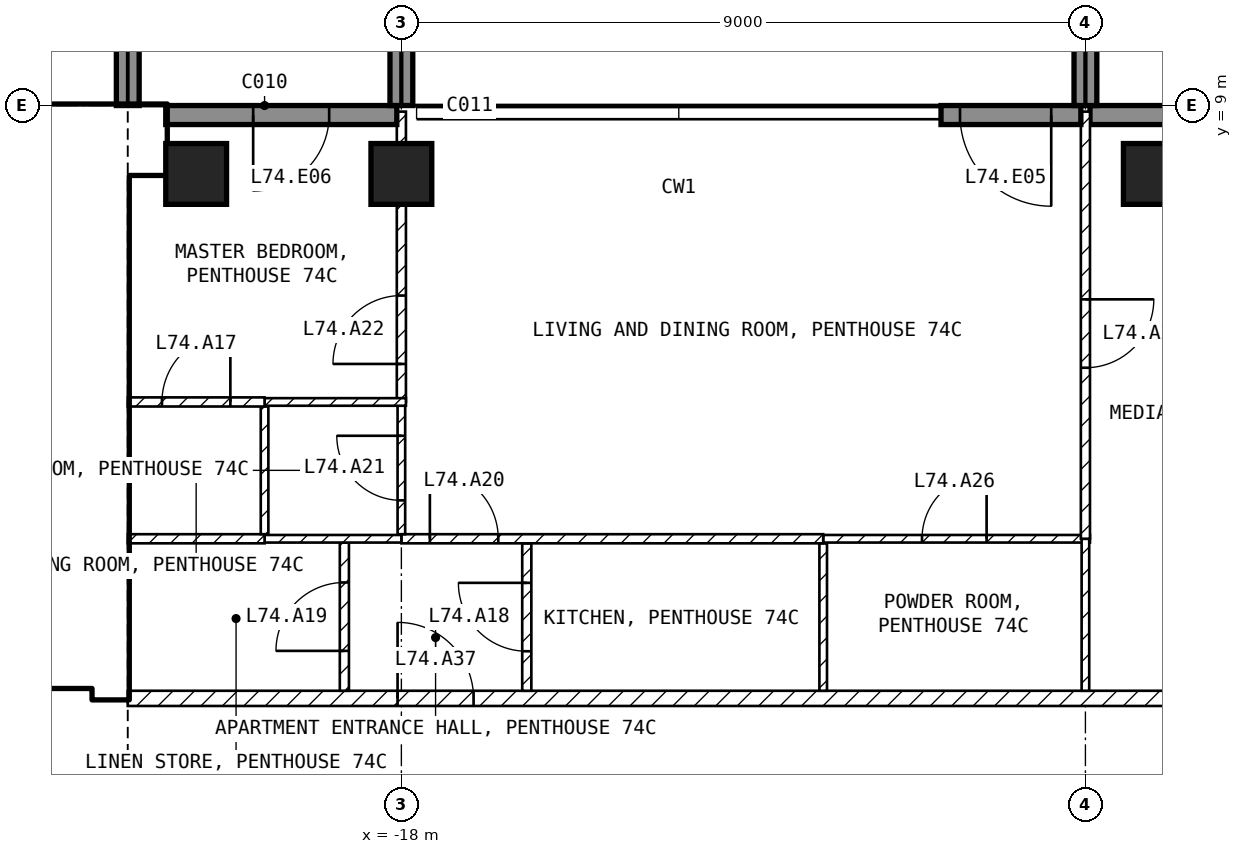
"""IFC4 building model, lengths in metres.
Left out: names, types, materials, properties, quantities, classifications, styles, units other than length and angle.
Written with IfcOpenShell. Run it as: python <this file> out.ifc"""

import sys

from ifc_helpers import new_model, si_unit, direction, frame, frame_2d, origin, origin_2d, place, context, subcontext, project, spatial, rectangle, extrude, element, fill, save


model = new_model("IFC4")
c1 = context("Model", 3, precision=1e-05, world=origin(), true_north=direction((0.0, 1.0)))
c2 = subcontext(c1, "Body", "Model", "MODEL_VIEW")
j1 = project(units=[si_unit("LENGTHUNIT", "METRE"), si_unit("PLANEANGLEUNIT", "RADIAN")], contexts=[c1])
p1 = place(None, origin())
s1 = spatial("IfcSite", under=j1, at=p1, CompositionType="ELEMENT")
p2 = place(p1, origin())
s2 = spatial("IfcBuilding", under=s1, at=p2, CompositionType="ELEMENT")
p3 = place(p2, frame((0.0, 0.0, 290.4)))
s3 = spatial("IfcBuildingStorey", under=s2, at=p3, CompositionType="ELEMENT", Elevation=290.4)
for number, where, z_axis, x_axis in (
    (1, (-20.7, 8.1, -0.25), (0.0, 0.0, 1.0), (1.0, 0.0, 0.0)),
    (2, (-18.0, 8.1, -0.25), (0.0, 0.0, 1.0), (1.0, 0.0, 0.0)),
    (3, (-8.1, 8.1, -0.25), (0.0, 0.0, 1.0), (1.0, 0.0, 0.0)),
):
    element("IfcColumn", number, at=place(p3, frame(where, z_axis=z_axis, x_axis=x_axis)), inside=s3, PredefinedType="COLUMN", context=c2, shape_type="SweptSolid", body=[
        extrude(rectangle(XDim=0.8, YDim=0.8, at=origin_2d()), origin(), (0.0, 0.0, 1.0), 4.2),
    ])
p4 = place(p3, frame((-5.9, 8.875, 0.0), z_axis=(0.0, 0.0, 1.0), x_axis=(-1.0, 0.0, 0.0)))
e4 = element("IfcWall", 4, at=p4, inside=s3, PredefinedType="SOLIDWALL", context=c2, shape_type="SweptSolid", body=[
    extrude(rectangle(XDim=3.04, YDim=0.25, at=frame_2d((1.52, 0.0))), origin(), (0.0, 0.0, 1.0), 3.95),
])
p5 = place(p4, frame((0.25, 0.0, 0.0)))
e5 = element("IfcOpeningElement", 5, at=p5, cuts=e4, PredefinedType="OPENING", context=c2, shape_type="SweptSolid", body=[
    extrude(rectangle(XDim=1.2, YDim=2.4, at=frame_2d((0.6, 1.2))), frame((0.0, 0.135, 0.0), z_axis=(0.0, -1.0, 0.0), x_axis=(1.0, 0.0, 0.0)), (0.0, 0.0, 1.0), 0.27),
])
p6 = place(p3, frame((-9.06, 8.875, 0.0), z_axis=(0.0, 0.0, 1.0), x_axis=(-1.0, 0.0, 0.0)))
e6 = element("IfcWall", 6, at=p6, inside=s3, PredefinedType="SOLIDWALL", context=c2, shape_type="SweptSolid", body=[
    extrude(rectangle(XDim=1.84, YDim=0.25, at=frame_2d((0.92, 0.0))), origin(), (0.0, 0.0, 1.0), 3.95),
])
p7 = place(p6, frame((0.39, 0.0, 0.0)))
e7 = element("IfcOpeningElement", 7, at=p7, cuts=e6, PredefinedType="OPENING", context=c2, shape_type="SweptSolid", body=[
    extrude(rectangle(XDim=1.2, YDim=2.4, at=frame_2d((0.6, 1.2))), frame((0.0, 0.135, 0.0), z_axis=(0.0, -1.0, 0.0), x_axis=(1.0, 0.0, 0.0)), (0.0, 0.0, 1.0), 0.27),
])
p8 = place(p3, frame((-18.06, 8.875, 0.0), z_axis=(0.0, 0.0, 1.0), x_axis=(-1.0, 0.0, 0.0)))
e8 = element("IfcWall", 8, at=p8, inside=s3, PredefinedType="SOLIDWALL", context=c2, shape_type="SweptSolid", body=[
    extrude(rectangle(XDim=3.04, YDim=0.25, at=frame_2d((1.52, 0.0))), origin(), (0.0, 0.0, 1.0), 3.95),
])
p9 = place(p8, frame((0.89, 0.0, 0.0)))
e9 = element("IfcOpeningElement", 9, at=p9, cuts=e8, PredefinedType="OPENING", context=c2, shape_type="SweptSolid", body=[
    extrude(rectangle(XDim=1.0, YDim=2.4, at=frame_2d((0.5, 1.2))), frame((0.0, 0.135, 0.0), z_axis=(0.0, -1.0, 0.0), x_axis=(1.0, 0.0, 0.0)), (0.0, 0.0, 1.0), 0.27),
])
for number, where, z_axis, x_axis in (
    (10, (-21.6, 9.0, 0.0), (0.0, 0.0, 1.0), (0.0, 1.0, 0.0)),
    (11, (-18.0, 9.0, 0.0), (0.0, 0.0, 1.0), (0.0, 1.0, 0.0)),
    (12, (-9.0, 9.0, 0.0), (0.0, 0.0, 1.0), (0.0, 1.0, 0.0)),
):
    element("IfcWall", number, at=place(p3, frame(where, z_axis=z_axis, x_axis=x_axis)), inside=s3, PredefinedType="SOLIDWALL", context=c2, shape_type="SweptSolid", body=[
        extrude(rectangle(XDim=2.7, YDim=0.3, at=frame_2d((1.35, 0.0))), origin(), (0.0, 0.0, 1.0), 3.95),
    ])
p10 = place(p3, frame((-29.75, 8.55, 0.0), z_axis=(0.0, 0.0, 1.0), x_axis=(1.0, 0.0, 0.0)))
e13 = element("IfcWall", 13, at=p10, inside=s3, PredefinedType="SHEAR", context=c2, shape_type="SweptSolid", body=[
    extrude(rectangle(XDim=8.65, YDim=0.9, at=frame_2d((4.325, 0.0))), origin(), (0.0, 0.0, 1.0), 3.95),
])
p11 = place(p3, frame((-21.825, 1.2, 0.0), z_axis=(0.0, 0.0, 1.0), x_axis=(0.0, 1.0, 0.0)))
e14 = element("IfcWall", 14, at=p11, inside=s3, PredefinedType="SHEAR", context=c2, shape_type="SweptSolid", body=[
    extrude(rectangle(XDim=6.9, YDim=0.45, at=frame_2d((3.45, 0.0))), origin(), (0.0, 0.0, 1.0), 3.95),
])
p12 = place(p3, frame((-33.35, 1.45, 0.0), z_axis=(0.0, 0.0, 1.0), x_axis=(1.0, 0.0, 0.0)))
e15 = element("IfcWall", 15, at=p12, inside=s3, PredefinedType="SOLIDWALL", context=c2, shape_type="SweptSolid", body=[
    extrude(rectangle(XDim=11.3, YDim=0.2, at=frame_2d((5.65, 0.0))), origin(), (0.0, 0.0, 1.0), 3.95),
])
p13 = place(p12, frame((9.55, 0.0, 0.0)))
e16 = element("IfcOpeningElement", 16, at=p13, cuts=e15, PredefinedType="OPENING", context=c2, shape_type="SweptSolid", body=[
    extrude(rectangle(XDim=1.0, YDim=2.1, at=frame_2d((0.5, 1.05))), frame((0.0, 0.11, 0.0), z_axis=(0.0, -1.0, 0.0), x_axis=(1.0, 0.0, 0.0)), (0.0, 0.0, 1.0), 0.22),
])
p14 = place(p12, frame((7.05, 0.0, 0.0)))
e17 = element("IfcOpeningElement", 17, at=p14, cuts=e15, PredefinedType="OPENING", context=c2, shape_type="SweptSolid", body=[
    extrude(rectangle(XDim=1.0, YDim=2.1, at=frame_2d((0.5, 1.05))), frame((0.0, 0.11, 0.0), z_axis=(0.0, -1.0, 0.0), x_axis=(1.0, 0.0, 0.0)), (0.0, 0.0, 1.0), 0.22),
])
p15 = place(p12, frame((1.175, 0.0, 0.0)))
e18 = element("IfcOpeningElement", 18, at=p15, cuts=e15, PredefinedType="OPENING", context=c2, shape_type="SweptSolid", body=[
    extrude(rectangle(XDim=0.9, YDim=2.1, at=frame_2d((0.45, 1.05))), frame((0.0, 0.11, 0.0), z_axis=(0.0, -1.0, 0.0), x_axis=(1.0, 0.0, 0.0)), (0.0, 0.0, 1.0), 0.22),
])
p16 = place(p3, frame((-28.35, 5.15, 0.0), z_axis=(0.0, 0.0, 1.0), x_axis=(1.0, 0.0, 0.0)))
e19 = element("IfcWall", 19, at=p16, inside=s3, PredefinedType="SOLIDWALL", context=c2, shape_type="SweptSolid", body=[
    extrude(rectangle(XDim=6.3, YDim=0.2, at=frame_2d((3.15, 0.0))), origin(), (0.0, 0.0, 1.0), 3.95),
])
p17 = place(p16, frame((5.1, 0.0, 0.0)))
e20 = element("IfcOpeningElement", 20, at=p17, cuts=e19, PredefinedType="OPENING", context=c2, shape_type="SweptSolid", body=[
    extrude(rectangle(XDim=1.0, YDim=2.1, at=frame_2d((0.5, 1.05))), frame((0.0, 0.11, 0.0), z_axis=(0.0, -1.0, 0.0), x_axis=(1.0, 0.0, 0.0)), (0.0, 0.0, 1.0), 0.22),
])
p18 = place(p3, frame((-21.6, 1.2, 0.0), z_axis=(0.0, 0.0, 1.0), x_axis=(1.0, 0.0, 0.0)))
e21 = element("IfcWall", 21, at=p18, inside=s3, PredefinedType="PARTITIONING", context=c2, shape_type="SweptSolid", body=[
    extrude(rectangle(XDim=20.5, YDim=0.2, at=frame_2d((10.25, 0.0))), origin(), (0.0, 0.0, 1.0), 3.95),
])
p19 = place(p18, frame((3.55, 0.0, 0.0)))
e22 = element("IfcOpeningElement", 22, at=p19, cuts=e21, PredefinedType="OPENING", context=c2, shape_type="SweptSolid", body=[
    extrude(rectangle(XDim=1.0, YDim=2.1, at=frame_2d((0.5, 1.05))), frame((0.0, 0.11, 0.0), z_axis=(0.0, -1.0, 0.0), x_axis=(1.0, 0.0, 0.0)), (0.0, 0.0, 1.0), 0.22),
])
p20 = place(p3, frame((-12.45, 1.3, 0.0), z_axis=(0.0, 0.0, 1.0), x_axis=(0.0, 1.0, 0.0)))
e23 = element("IfcWall", 23, at=p20, inside=s3, PredefinedType="PARTITIONING", context=c2, shape_type="SweptSolid", body=[
    extrude(rectangle(XDim=1.94, YDim=0.1, at=frame_2d((0.97, 0.0))), origin(), (0.0, 0.0, 1.0), 3.95),
])
p21 = place(p3, frame((-12.45, 3.3, 0.0), z_axis=(0.0, 0.0, 1.0), x_axis=(1.0, 0.0, 0.0)))
e24 = element("IfcWall", 24, at=p21, inside=s3, PredefinedType="PARTITIONING", context=c2, shape_type="SweptSolid", body=[
    extrude(rectangle(XDim=3.51, YDim=0.1, at=frame_2d((1.755, 0.0))), origin(), (0.0, 0.0, 1.0), 3.95),
])
p22 = place(p21, frame((1.3, 0.0, 0.0)))
e25 = element("IfcOpeningElement", 25, at=p22, cuts=e24, PredefinedType="OPENING", context=c2, shape_type="SweptSolid", body=[
    extrude(rectangle(XDim=0.85, YDim=2.1, at=frame_2d((0.425, 1.05))), frame((0.0, 0.06, 0.0), z_axis=(0.0, -1.0, 0.0), x_axis=(1.0, 0.0, 0.0)), (0.0, 0.0, 1.0), 0.12),
])
p23 = place(p3, frame((-9.0, 3.3, 0.0), z_axis=(0.0, 0.0, 1.0), x_axis=(0.0, -1.0, 0.0)))
e26 = element("IfcWall", 26, at=p23, inside=s3, PredefinedType="PARTITIONING", context=c2, shape_type="SweptSolid", body=[
    extrude(rectangle(XDim=2.0, YDim=0.1, at=frame_2d((1.0, 0.0))), origin(), (0.0, 0.0, 1.0), 3.95),
])
p24 = place(p3, frame((-16.35, 1.3, 0.0), z_axis=(0.0, 0.0, 1.0), x_axis=(0.0, 1.0, 0.0)))
e27 = element("IfcWall", 27, at=p24, inside=s3, PredefinedType="PARTITIONING", context=c2, shape_type="SweptSolid", body=[
    extrude(rectangle(XDim=1.94, YDim=0.12, at=frame_2d((0.97, 0.0))), origin(), (0.0, 0.0, 1.0), 3.95),
])
p25 = place(p24, frame((0.52, 0.0, 0.0)))
e28 = element("IfcOpeningElement", 28, at=p25, cuts=e27, PredefinedType="OPENING", context=c2, shape_type="SweptSolid", body=[
    extrude(rectangle(XDim=0.9, YDim=2.1, at=frame_2d((0.45, 1.05))), frame((0.0, 0.07, 0.0), z_axis=(0.0, -1.0, 0.0), x_axis=(1.0, 0.0, 0.0)), (0.0, 0.0, 1.0), 0.14),
])
p26 = place(p3, frame((-18.0, 3.3, 0.0), z_axis=(0.0, 0.0, 1.0), x_axis=(1.0, 0.0, 0.0)))
e29 = element("IfcWall", 29, at=p26, inside=s3, PredefinedType="PARTITIONING", context=c2, shape_type="SweptSolid", body=[
    extrude(rectangle(XDim=5.55, YDim=0.12, at=frame_2d((2.775, 0.0))), origin(), (0.0, 0.0, 1.0), 3.95),
])
p27 = place(p26, frame((0.375, 0.0, 0.0)))
e30 = element("IfcOpeningElement", 30, at=p27, cuts=e29, PredefinedType="OPENING", context=c2, shape_type="SweptSolid", body=[
    extrude(rectangle(XDim=0.9, YDim=2.1, at=frame_2d((0.45, 1.05))), frame((0.0, 0.07, 0.0), z_axis=(0.0, -1.0, 0.0), x_axis=(1.0, 0.0, 0.0)), (0.0, 0.0, 1.0), 0.14),
])
p28 = place(p3, frame((-18.75, 1.3, 0.0), z_axis=(0.0, 0.0, 1.0), x_axis=(0.0, 1.0, 0.0)))
e31 = element("IfcWall", 31, at=p28, inside=s3, PredefinedType="PARTITIONING", context=c2, shape_type="SweptSolid", body=[
    extrude(rectangle(XDim=1.95, YDim=0.12, at=frame_2d((0.975, 0.0))), origin(), (0.0, 0.0, 1.0), 3.95),
])
p29 = place(p28, frame((0.525, 0.0, 0.0)))
e32 = element("IfcOpeningElement", 32, at=p29, cuts=e31, PredefinedType="OPENING", context=c2, shape_type="SweptSolid", body=[
    extrude(rectangle(XDim=0.9, YDim=2.1, at=frame_2d((0.45, 1.05))), frame((0.0, 0.07, 0.0), z_axis=(0.0, -1.0, 0.0), x_axis=(1.0, 0.0, 0.0)), (0.0, 0.0, 1.0), 0.14),
])
p30 = place(p3, frame((-19.8, 3.3, 0.0), z_axis=(0.0, 0.0, 1.0), x_axis=(1.0, 0.0, 0.0)))
e33 = element("IfcWall", 33, at=p30, inside=s3, PredefinedType="PARTITIONING", context=c2, shape_type="SweptSolid", body=[
    extrude(rectangle(XDim=1.8, YDim=0.1, at=frame_2d((0.9, 0.0))), origin(), (0.0, 0.0, 1.0), 3.95),
])
p31 = place(p3, frame((-21.6, 3.3, 0.0), z_axis=(0.0, 0.0, 1.0), x_axis=(1.0, 0.0, 0.0)))
e34 = element("IfcWall", 34, at=p31, inside=s3, PredefinedType="PARTITIONING", context=c2, shape_type="SweptSolid", body=[
    extrude(rectangle(XDim=1.8, YDim=0.12, at=frame_2d((0.9, 0.0))), origin(), (0.0, 0.0, 1.0), 3.95),
])
p32 = place(p3, frame((-18.0, 3.36, 0.0), z_axis=(0.0, 0.0, 1.0), x_axis=(0.0, 1.0, 0.0)))
e35 = element("IfcWall", 35, at=p32, inside=s3, PredefinedType="PARTITIONING", context=c2, shape_type="SweptSolid", body=[
    extrude(rectangle(XDim=1.74, YDim=0.1, at=frame_2d((0.87, 0.0))), origin(), (0.0, 0.0, 1.0), 3.196),
])
p33 = place(p32, frame((0.445, 0.0, 0.0)))
e36 = element("IfcOpeningElement", 36, at=p33, cuts=e35, PredefinedType="OPENING", context=c2, shape_type="SweptSolid", body=[
    extrude(rectangle(XDim=0.85, YDim=2.1, at=frame_2d((0.425, 1.05))), frame((0.0, 0.06, 0.0), z_axis=(0.0, -1.0, 0.0), x_axis=(1.0, 0.0, 0.0)), (0.0, 0.0, 1.0), 0.12),
])
p34 = place(p3, frame((-18.0, 5.1, 0.0), z_axis=(0.0, 0.0, 1.0), x_axis=(0.0, 1.0, 0.0)))
e37 = element("IfcWall", 37, at=p34, inside=s3, PredefinedType="PARTITIONING", context=c2, shape_type="SweptSolid", body=[
    extrude(rectangle(XDim=3.82, YDim=0.12, at=frame_2d((1.91, 0.0))), origin(), (0.0, 0.0, 1.0), 3.196),
])
p35 = place(p34, frame((0.5, 0.0, 0.0)))
e38 = element("IfcOpeningElement", 38, at=p35, cuts=e37, PredefinedType="OPENING", context=c2, shape_type="SweptSolid", body=[
    extrude(rectangle(XDim=0.9, YDim=2.1, at=frame_2d((0.45, 1.05))), frame((0.0, 0.07, 0.0), z_axis=(0.0, -1.0, 0.0), x_axis=(1.0, 0.0, 0.0)), (0.0, 0.0, 1.0), 0.14),
])
p36 = place(p3, frame((-9.0, 8.92, 0.0), z_axis=(0.0, 0.0, 1.0), x_axis=(0.0, -1.0, 0.0)))
e39 = element("IfcWall", 39, at=p36, inside=s3, PredefinedType="PARTITIONING", context=c2, shape_type="SweptSolid", body=[
    extrude(rectangle(XDim=5.62, YDim=0.12, at=frame_2d((2.81, 0.0))), origin(), (0.0, 0.0, 1.0), 3.95),
])
p37 = place(p36, frame((2.47, 0.0, 0.0)))
e40 = element("IfcOpeningElement", 40, at=p37, cuts=e39, PredefinedType="OPENING", context=c2, shape_type="SweptSolid", body=[
    extrude(rectangle(XDim=0.9, YDim=2.1, at=frame_2d((0.45, 1.05))), frame((0.0, 0.07, 0.0), z_axis=(0.0, -1.0, 0.0), x_axis=(1.0, 0.0, 0.0)), (0.0, 0.0, 1.0), 0.14),
])
p38 = place(p3, frame((-19.8, 3.36, 0.0), z_axis=(0.0, 0.0, 1.0), x_axis=(0.0, 1.0, 0.0)))
e41 = element("IfcWall", 41, at=p38, inside=s3, PredefinedType="PARTITIONING", context=c2, shape_type="SweptSolid", body=[
    extrude(rectangle(XDim=1.68, YDim=0.1, at=frame_2d((0.84, 0.0))), origin(), (0.0, 0.0, 1.0), 3.95),
])
p39 = place(p3, frame((-19.8, 5.1, 0.0), z_axis=(0.0, 0.0, 1.0), x_axis=(1.0, 0.0, 0.0)))
e42 = element("IfcWall", 42, at=p39, inside=s3, PredefinedType="PARTITIONING", context=c2, shape_type="SweptSolid", body=[
    extrude(rectangle(XDim=1.86, YDim=0.1, at=frame_2d((0.93, 0.0))), origin(), (0.0, 0.0, 1.0), 3.95),
])
p40 = place(p3, frame((-21.6, 5.1, 0.0), z_axis=(0.0, 0.0, 1.0), x_axis=(1.0, 0.0, 0.0)))
e43 = element("IfcWall", 43, at=p40, inside=s3, PredefinedType="PARTITIONING", context=c2, shape_type="SweptSolid", body=[
    extrude(rectangle(XDim=1.8, YDim=0.12, at=frame_2d((0.9, 0.0))), origin(), (0.0, 0.0, 1.0), 3.95),
])
p41 = place(p40, frame((0.45, 0.0, 0.0)))
e44 = element("IfcOpeningElement", 44, at=p41, cuts=e43, PredefinedType="OPENING", context=c2, shape_type="SweptSolid", body=[
    extrude(rectangle(XDim=0.9, YDim=2.1, at=frame_2d((0.45, 1.05))), frame((0.0, 0.07, 0.0), z_axis=(0.0, -1.0, 0.0), x_axis=(1.0, 0.0, 0.0)), (0.0, 0.0, 1.0), 0.14),
])
p42 = place(p7, origin())
e45 = element("IfcDoor", 45, at=p42, inside=s3, OperationType="SINGLE_SWING_LEFT", PredefinedType="DOOR", context=c2, shape_type="SweptSolid", body=[
    extrude(rectangle(XDim=1.2, YDim=2.4, at=frame_2d((0.6, 1.2))), frame((0.0, 0.025, 0.0), z_axis=(0.0, -1.0, 0.0), x_axis=(1.0, 0.0, 0.0)), (0.0, 0.0, 1.0), 0.05),
])
fill(e7, e45)
p43 = place(p9, origin())
e46 = element("IfcDoor", 46, at=p43, inside=s3, OperationType="SINGLE_SWING_RIGHT", PredefinedType="DOOR", context=c2, shape_type="SweptSolid", body=[
    extrude(rectangle(XDim=1.0, YDim=2.4, at=frame_2d((0.5, 1.2))), frame((0.0, 0.025, 0.0), z_axis=(0.0, -1.0, 0.0), x_axis=(1.0, 0.0, 0.0)), (0.0, 0.0, 1.0), 0.05),
])
fill(e9, e46)
p44 = place(p17, origin())
e47 = element("IfcDoor", 47, at=p44, inside=s3, OperationType="SINGLE_SWING_LEFT", PredefinedType="DOOR", context=c2, shape_type="SweptSolid", body=[
    extrude(rectangle(XDim=1.0, YDim=2.1, at=frame_2d((0.5, 1.05))), frame((0.0, 0.025, 0.0), z_axis=(0.0, -1.0, 0.0), x_axis=(1.0, 0.0, 0.0)), (0.0, 0.0, 1.0), 0.05),
])
fill(e20, e47)
p45 = place(p41, origin())
e48 = element("IfcDoor", 48, at=p45, inside=s3, OperationType="SINGLE_SWING_RIGHT", PredefinedType="DOOR", context=c2, shape_type="SweptSolid", body=[
    extrude(rectangle(XDim=0.9, YDim=2.1, at=frame_2d((0.45, 1.05))), frame((0.0, 0.025, 0.0), z_axis=(0.0, -1.0, 0.0), x_axis=(1.0, 0.0, 0.0)), (0.0, 0.0, 1.0), 0.05),
])
fill(e44, e48)
p46 = place(p25, origin())
e49 = element("IfcDoor", 49, at=p46, inside=s3, OperationType="SINGLE_SWING_RIGHT", PredefinedType="DOOR", context=c2, shape_type="SweptSolid", body=[
    extrude(rectangle(XDim=0.9, YDim=2.1, at=frame_2d((0.45, 1.05))), frame((0.0, 0.025, 0.0), z_axis=(0.0, -1.0, 0.0), x_axis=(1.0, 0.0, 0.0)), (0.0, 0.0, 1.0), 0.05),
])
fill(e28, e49)
p47 = place(p29, origin())
e50 = element("IfcDoor", 50, at=p47, inside=s3, OperationType="SINGLE_SWING_LEFT", PredefinedType="DOOR", context=c2, shape_type="SweptSolid", body=[
    extrude(rectangle(XDim=0.9, YDim=2.1, at=frame_2d((0.45, 1.05))), frame((0.0, 0.025, 0.0), z_axis=(0.0, -1.0, 0.0), x_axis=(1.0, 0.0, 0.0)), (0.0, 0.0, 1.0), 0.05),
])
fill(e32, e50)
p48 = place(p27, origin())
e51 = element("IfcDoor", 51, at=p48, inside=s3, OperationType="SINGLE_SWING_LEFT", PredefinedType="DOOR", context=c2, shape_type="SweptSolid", body=[
    extrude(rectangle(XDim=0.9, YDim=2.1, at=frame_2d((0.45, 1.05))), frame((0.0, 0.025, 0.0), z_axis=(0.0, -1.0, 0.0), x_axis=(1.0, 0.0, 0.0)), (0.0, 0.0, 1.0), 0.05),
])
fill(e30, e51)
p49 = place(p33, origin())
e52 = element("IfcDoor", 52, at=p49, inside=s3, OperationType="SINGLE_SWING_RIGHT", PredefinedType="DOOR", context=c2, shape_type="SweptSolid", body=[
    extrude(rectangle(XDim=0.85, YDim=2.1, at=frame_2d((0.425, 1.05))), frame((0.0, 0.025, 0.0), z_axis=(0.0, -1.0, 0.0), x_axis=(1.0, 0.0, 0.0)), (0.0, 0.0, 1.0), 0.05),
])
fill(e36, e52)
p50 = place(p35, origin())
e53 = element("IfcDoor", 53, at=p50, inside=s3, OperationType="SINGLE_SWING_LEFT", PredefinedType="DOOR", context=c2, shape_type="SweptSolid", body=[
    extrude(rectangle(XDim=0.9, YDim=2.1, at=frame_2d((0.45, 1.05))), frame((0.0, 0.025, 0.0), z_axis=(0.0, -1.0, 0.0), x_axis=(1.0, 0.0, 0.0)), (0.0, 0.0, 1.0), 0.05),
])
fill(e38, e53)
p51 = place(p37, origin())
e54 = element("IfcDoor", 54, at=p51, inside=s3, OperationType="SINGLE_SWING_LEFT", PredefinedType="DOOR", context=c2, shape_type="SweptSolid", body=[
    extrude(rectangle(XDim=0.9, YDim=2.1, at=frame_2d((0.45, 1.05))), frame((0.0, 0.025, 0.0), z_axis=(0.0, -1.0, 0.0), x_axis=(1.0, 0.0, 0.0)), (0.0, 0.0, 1.0), 0.05),
])
fill(e40, e54)
p52 = place(p22, origin())
e55 = element("IfcDoor", 55, at=p52, inside=s3, OperationType="SINGLE_SWING_RIGHT", PredefinedType="DOOR", context=c2, shape_type="SweptSolid", body=[
    extrude(rectangle(XDim=0.85, YDim=2.1, at=frame_2d((0.425, 1.05))), frame((0.0, 0.025, 0.0), z_axis=(0.0, -1.0, 0.0), x_axis=(1.0, 0.0, 0.0)), (0.0, 0.0, 1.0), 0.05),
])
fill(e25, e55)
p53 = place(p19, origin())
e56 = element("IfcDoor", 56, at=p53, inside=s3, OperationType="SINGLE_SWING_LEFT", PredefinedType="DOOR", context=c2, shape_type="SweptSolid", body=[
    extrude(rectangle(XDim=1.0, YDim=2.1, at=frame_2d((0.5, 1.05))), frame((0.0, 0.025, 0.0), z_axis=(0.0, -1.0, 0.0), x_axis=(1.0, 0.0, 0.0)), (0.0, 0.0, 1.0), 0.05),
])
fill(e22, e56)
save(model, sys.argv[1])
